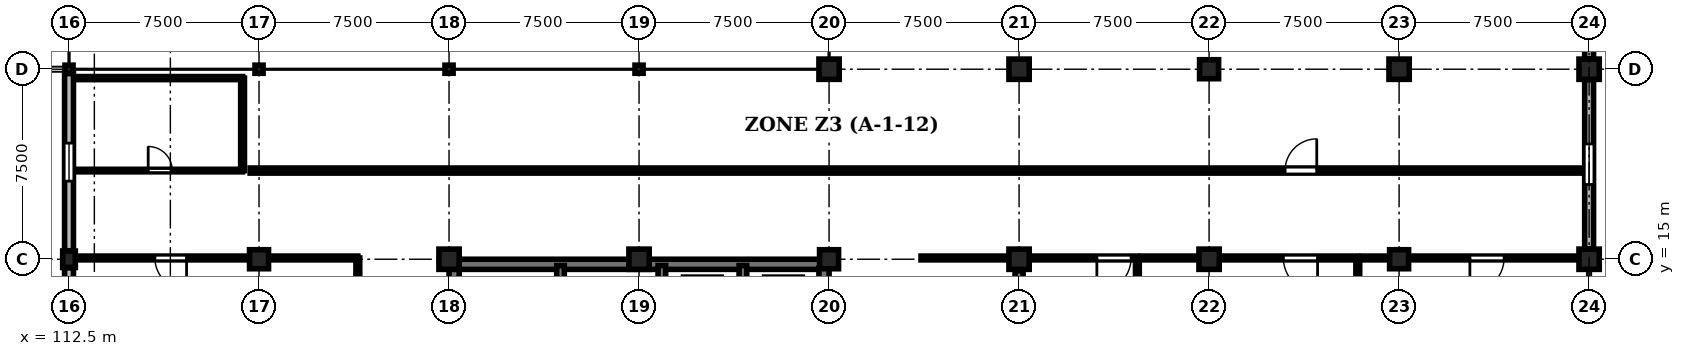
"""IFC4 building model, lengths in metres.
Left out: names, types, materials, properties, quantities, classifications, styles, units other than length and angle.
Written with IfcOpenShell. Run it as: python <this file> out.ifc"""

import sys

from ifc_helpers import new_model, si_unit, direction, frame, frame_2d, origin, origin_2d, place, context, subcontext, project, spatial, rectangle, circle, extrude, element, fill, save


model = new_model("IFC4")
c1 = context("Model", 3, precision=1e-05, world=origin(), true_north=direction((0.0, 1.0)))
c2 = subcontext(c1, "Body", "Model", "MODEL_VIEW")
j1 = project(units=[si_unit("LENGTHUNIT", "METRE"), si_unit("PLANEANGLEUNIT", "RADIAN")], contexts=[c1])
p1 = place(None, origin())
s1 = spatial("IfcSite", under=j1, at=p1, CompositionType="ELEMENT")
p2 = place(p1, origin())
s2 = spatial("IfcBuilding", under=s1, at=p2, CompositionType="ELEMENT")
p3 = place(p2, origin())
s3 = spatial("IfcBuildingStorey", under=s2, at=p3, CompositionType="ELEMENT", Elevation=0.0)
p4 = place(p3, frame((112.5, 15.0, 0.0), z_axis=(0.0, 0.0, 1.0), x_axis=(1.0, 0.0, 0.0)))
e1 = element("IfcColumn", 1, at=p4, inside=s3, PredefinedType="COLUMN", context=c2, shape_type="SweptSolid", body=[
    extrude(rectangle(XDim=0.5, YDim=0.65, at=origin_2d()), origin(), (0.0, 0.0, 1.0), 4.8),
])
p5 = place(p3, frame((112.5, 22.5, 0.0), z_axis=(0.0, 0.0, 1.0), x_axis=(1.0, 0.0, 0.0)))
e2 = element("IfcColumn", 2, at=p5, inside=s3, PredefinedType="COLUMN", context=c2, shape_type="SweptSolid", body=[
    extrude(rectangle(XDim=0.32, YDim=0.32, at=origin_2d()), origin(), (0.0, 0.0, 1.0), 4.8),
])
p6 = place(p3, frame((120.0, 15.0, 0.0), z_axis=(0.0, 0.0, 1.0), x_axis=(1.0, 0.0, 0.0)))
e3 = element("IfcColumn", 3, at=p6, inside=s3, PredefinedType="COLUMN", context=c2, shape_type="SweptSolid", body=[
    extrude(circle(Radius=0.375, at=origin_2d()), origin(), (0.0, 0.0, 1.0), 4.8),
])
p7 = place(p3, frame((120.0, 22.5, 0.0), z_axis=(0.0, 0.0, 1.0), x_axis=(1.0, 0.0, 0.0)))
e4 = element("IfcColumn", 4, at=p7, inside=s3, PredefinedType="COLUMN", context=c2, shape_type="SweptSolid", body=[
    extrude(rectangle(XDim=0.32, YDim=0.32, at=origin_2d()), origin(), (0.0, 0.0, 1.0), 4.8),
])
p8 = place(p3, frame((127.5, 15.0, 0.0), z_axis=(0.0, 0.0, 1.0), x_axis=(1.0, 0.0, 0.0)))
e5 = element("IfcColumn", 5, at=p8, inside=s3, PredefinedType="COLUMN", context=c2, shape_type="SweptSolid", body=[
    extrude(rectangle(XDim=0.8, YDim=0.8, at=origin_2d()), origin(), (0.0, 0.0, 1.0), 4.8),
])
p9 = place(p3, frame((127.5, 22.5, 0.0), z_axis=(0.0, 0.0, 1.0), x_axis=(1.0, 0.0, 0.0)))
e6 = element("IfcColumn", 6, at=p9, inside=s3, PredefinedType="COLUMN", context=c2, shape_type="SweptSolid", body=[
    extrude(rectangle(XDim=0.32, YDim=0.32, at=origin_2d()), origin(), (0.0, 0.0, 1.0), 4.8),
])
p10 = place(p3, frame((135.0, 15.0, 0.0), z_axis=(0.0, 0.0, 1.0), x_axis=(1.0, 0.0, 0.0)))
e7 = element("IfcColumn", 7, at=p10, inside=s3, PredefinedType="COLUMN", context=c2, shape_type="SweptSolid", body=[
    extrude(rectangle(XDim=0.8, YDim=0.8, at=origin_2d()), origin(), (0.0, 0.0, 1.0), 4.8),
])
p11 = place(p3, frame((135.0, 22.5, 0.0), z_axis=(0.0, 0.0, 1.0), x_axis=(1.0, 0.0, 0.0)))
e8 = element("IfcColumn", 8, at=p11, inside=s3, PredefinedType="COLUMN", context=c2, shape_type="SweptSolid", body=[
    extrude(rectangle(XDim=0.32, YDim=0.32, at=origin_2d()), origin(), (0.0, 0.0, 1.0), 4.8),
])
p12 = place(p3, frame((142.5, 15.0, 0.0), z_axis=(0.0, 0.0, 1.0), x_axis=(1.0, 0.0, 0.0)))
e9 = element("IfcColumn", 9, at=p12, inside=s3, PredefinedType="COLUMN", context=c2, shape_type="SweptSolid", body=[
    extrude(circle(Radius=0.375, at=origin_2d()), origin(), (0.0, 0.0, 1.0), 4.8),
])
for number, where, z_axis, x_axis in (
    (10, (142.5, 22.5, 0.0), (0.0, 0.0, 1.0), (1.0, 0.0, 0.0)),
    (11, (150.0, 15.0, 0.0), (0.0, 0.0, 1.0), (1.0, 0.0, 0.0)),
    (12, (150.0, 22.5, 0.0), (0.0, 0.0, 1.0), (1.0, 0.0, 0.0)),
    (13, (157.5, 15.0, 0.0), (0.0, 0.0, 1.0), (1.0, 0.0, 0.0)),
):
    element("IfcColumn", number, at=place(p3, frame(where, z_axis=z_axis, x_axis=x_axis)), inside=s3, PredefinedType="COLUMN", context=c2, shape_type="SweptSolid", body=[
        extrude(rectangle(XDim=0.8, YDim=0.8, at=origin_2d()), origin(), (0.0, 0.0, 1.0), 4.8),
    ])
for number, where, z_axis, x_axis in (
    (14, (157.5, 22.5, 0.0), (0.0, 0.0, 1.0), (1.0, 0.0, 0.0)),
    (15, (165.0, 15.0, 0.0), (0.0, 0.0, 1.0), (1.0, 0.0, 0.0)),
):
    element("IfcColumn", number, at=place(p3, frame(where, z_axis=z_axis, x_axis=x_axis)), inside=s3, PredefinedType="COLUMN", context=c2, shape_type="SweptSolid", body=[
        extrude(circle(Radius=0.375, at=origin_2d()), origin(), (0.0, 0.0, 1.0), 4.8),
    ])
for number, where, z_axis, x_axis in (
    (16, (165.0, 22.5, 0.0), (0.0, 0.0, 1.0), (1.0, 0.0, 0.0)),
    (17, (172.5, 15.0, 0.0), (0.0, 0.0, 1.0), (1.0, 0.0, 0.0)),
    (18, (172.5, 22.5, 0.0), (0.0, 0.0, 1.0), (1.0, 0.0, 0.0)),
):
    element("IfcColumn", number, at=place(p3, frame(where, z_axis=z_axis, x_axis=x_axis)), inside=s3, PredefinedType="COLUMN", context=c2, shape_type="SweptSolid", body=[
        extrude(rectangle(XDim=0.8, YDim=0.8, at=origin_2d()), origin(), (0.0, 0.0, 1.0), 4.8),
    ])
p13 = place(p3, frame((150.0, 7.95, 0.0), z_axis=(0.0, 0.0, 1.0), x_axis=(0.0, 1.0, 0.0)))
e19 = element("IfcWall", 19, at=p13, inside=s3, PredefinedType="SHEAR", context=c2, shape_type="SweptSolid", body=[
    extrude(rectangle(XDim=6.6, YDim=0.32, at=frame_2d((3.3, 0.0))), origin(), (0.0, 0.0, 1.0), 3.95),
])
p14 = place(p3, frame((112.5, 7.885, 0.0), z_axis=(0.0, 0.0, 1.0), x_axis=(0.0, 1.0, 0.0)))
e20 = element("IfcWall", 20, at=p14, inside=s3, PredefinedType="STANDARD", context=c2, shape_type="SweptSolid", body=[
    extrude(rectangle(XDim=6.78, YDim=0.35, at=frame_2d((3.39, 0.0))), origin(), (0.0, 0.0, 1.0), 3.9),
])
p15 = place(p14, frame((2.49, 0.0, 0.9)))
e21 = element("IfcOpeningElement", 21, at=p15, cuts=e20, PredefinedType="OPENING", context=c2, shape_type="SweptSolid", body=[
    extrude(rectangle(XDim=1.8, YDim=2.4, at=frame_2d((0.9, 1.2))), frame((0.0, 0.185, 0.0), z_axis=(0.0, -1.0, 0.0), x_axis=(1.0, 0.0, 0.0)), (0.0, 0.0, 1.0), 0.37),
])
p16 = place(p3, frame((112.5, 15.335, 0.0), z_axis=(0.0, 0.0, 1.0), x_axis=(0.0, 1.0, 0.0)))
e22 = element("IfcWall", 22, at=p16, inside=s3, PredefinedType="STANDARD", context=c2, shape_type="SweptSolid", body=[
    extrude(rectangle(XDim=6.995, YDim=0.35, at=frame_2d((3.498, 0.0))), origin(), (0.0, 0.0, 1.0), 3.9),
])
p17 = place(p16, frame((2.748, 0.0, 0.9)))
e23 = element("IfcOpeningElement", 23, at=p17, cuts=e22, PredefinedType="OPENING", context=c2, shape_type="SweptSolid", body=[
    extrude(rectangle(XDim=1.5, YDim=2.4, at=frame_2d((0.75, 1.2))), frame((0.0, 0.185, 0.0), z_axis=(0.0, -1.0, 0.0), x_axis=(1.0, 0.0, 0.0)), (0.0, 0.0, 1.0), 0.37),
])
p18 = place(p3, frame((172.5, 22.09, 0.0), z_axis=(0.0, 0.0, 1.0), x_axis=(0.0, -1.0, 0.0)))
e24 = element("IfcWall", 24, at=p18, inside=s3, PredefinedType="STANDARD", context=c2, shape_type="SweptSolid", body=[
    extrude(rectangle(XDim=6.68, YDim=0.35, at=frame_2d((3.34, 0.0))), origin(), (0.0, 0.0, 1.0), 3.9),
])
p19 = place(p18, frame((2.54, 0.0, 0.9)))
e25 = element("IfcOpeningElement", 25, at=p19, cuts=e24, PredefinedType="OPENING", context=c2, shape_type="SweptSolid", body=[
    extrude(rectangle(XDim=1.6, YDim=1.95, at=frame_2d((0.8, 0.975))), frame((0.0, 0.185, 0.0), z_axis=(0.0, -1.0, 0.0), x_axis=(1.0, 0.0, 0.0)), (0.0, 0.0, 1.0), 0.37),
])
p20 = place(p3, frame((172.5, 31.165, 0.0), z_axis=(0.0, 0.0, 1.0), x_axis=(0.0, -1.0, 0.0)))
e26 = element("IfcWall", 26, at=p20, inside=s3, PredefinedType="STANDARD", context=c2, shape_type="SweptSolid", body=[
    extrude(rectangle(XDim=8.255, YDim=0.35, at=frame_2d((4.127, 0.0))), origin(), (0.0, 0.0, 1.0), 3.95),
])
p21 = place(p20, frame((3.228, 0.0, 0.9)))
e27 = element("IfcOpeningElement", 27, at=p21, cuts=e26, PredefinedType="OPENING", context=c2, shape_type="SweptSolid", body=[
    extrude(rectangle(XDim=1.8, YDim=1.95, at=frame_2d((0.9, 0.975))), frame((0.0, 0.185, 0.0), z_axis=(0.0, -1.0, 0.0), x_axis=(1.0, 0.0, 0.0)), (0.0, 0.0, 1.0), 0.37),
])
p22 = place(p3, frame((127.85, 14.8, 0.0), z_axis=(0.0, 0.0, 1.0), x_axis=(1.0, 0.0, 0.0)))
e28 = element("IfcWall", 28, at=p22, inside=s3, PredefinedType="SHEAR", context=c2, shape_type="SweptSolid", body=[
    extrude(rectangle(XDim=14.3, YDim=0.4, at=frame_2d((7.15, 0.0))), origin(), (0.0, 0.0, 1.0), 4.5),
])
p23 = place(p3, frame((127.7, 7.85, 0.0), z_axis=(0.0, 0.0, 1.0), x_axis=(0.0, 1.0, 0.0)))
e29 = element("IfcWall", 29, at=p23, inside=s3, PredefinedType="SHEAR", context=c2, shape_type="SweptSolid", body=[
    extrude(rectangle(XDim=6.8, YDim=0.4, at=frame_2d((3.4, 0.0))), origin(), (0.0, 0.0, 1.0), 4.5),
])
p24 = place(p3, frame((142.3, 11.6, 0.0), z_axis=(0.0, 0.0, 1.0), x_axis=(0.0, 1.0, 0.0)))
e30 = element("IfcWall", 30, at=p24, inside=s3, PredefinedType="SHEAR", context=c2, shape_type="SweptSolid", body=[
    extrude(rectangle(XDim=3.05, YDim=0.4, at=frame_2d((1.525, 0.0))), origin(), (0.0, 0.0, 1.0), 4.5),
])
for number, where, z_axis, x_axis in (
    (31, (131.9, 11.6, 0.0), (0.0, 0.0, 1.0), (0.0, 1.0, 0.0)),
    (32, (135.9, 11.6, 0.0), (0.0, 0.0, 1.0), (0.0, 1.0, 0.0)),
    (33, (139.1, 11.6, 0.0), (0.0, 0.0, 1.0), (0.0, 1.0, 0.0)),
):
    element("IfcWall", number, at=place(p3, frame(where, z_axis=z_axis, x_axis=x_axis)), inside=s3, PredefinedType="SHEAR", context=c2, shape_type="SweptSolid", body=[
        extrude(rectangle(XDim=3.15, YDim=0.3, at=frame_2d((1.575, 0.0))), origin(), (0.0, 0.0, 1.0), 4.5),
    ])
p25 = place(p3, frame((123.9, 15.05, 0.0), z_axis=(0.0, 0.0, 1.0), x_axis=(-1.0, 0.0, 0.0)))
e34 = element("IfcWall", 34, at=p25, inside=s3, PredefinedType="PARTITIONING", context=c2, shape_type="SweptSolid", body=[
    extrude(rectangle(XDim=11.05, YDim=0.15, at=frame_2d((5.525, 0.0))), origin(), (0.0, 0.0, 1.0), 3.835),
])
p26 = place(p25, frame((6.76, 0.0, 0.0)))
e35 = element("IfcOpeningElement", 35, at=p26, cuts=e34, PredefinedType="OPENING", context=c2, shape_type="SweptSolid", body=[
    extrude(rectangle(XDim=1.25, YDim=2.2, at=frame_2d((0.625, 1.1))), frame((0.0, 0.085, 0.0), z_axis=(0.0, -1.0, 0.0), x_axis=(1.0, 0.0, 0.0)), (0.0, 0.0, 1.0), 0.17),
])
p27 = place(p3, frame((154.67, 15.05, 0.0), z_axis=(0.0, 0.0, 1.0), x_axis=(-1.0, 0.0, 0.0)))
e36 = element("IfcWall", 36, at=p27, inside=s3, PredefinedType="PARTITIONING", context=c2, shape_type="SweptSolid", body=[
    extrude(rectangle(XDim=8.54, YDim=0.15, at=frame_2d((4.27, 0.0))), origin(), (0.0, 0.0, 1.0), 3.835),
])
p28 = place(p27, frame((0.25, 0.0, 0.0)))
e37 = element("IfcOpeningElement", 37, at=p28, cuts=e36, PredefinedType="OPENING", context=c2, shape_type="SweptSolid", body=[
    extrude(rectangle(XDim=1.35, YDim=2.25, at=frame_2d((0.675, 1.125))), frame((0.0, 0.085, 0.0), z_axis=(0.0, -1.0, 0.0), x_axis=(1.0, 0.0, 0.0)), (0.0, 0.0, 1.0), 0.17),
])
p29 = place(p3, frame((163.37, 15.05, 0.0), z_axis=(0.0, 0.0, 1.0), x_axis=(-1.0, 0.0, 0.0)))
e38 = element("IfcWall", 38, at=p29, inside=s3, PredefinedType="PARTITIONING", context=c2, shape_type="SweptSolid", body=[
    extrude(rectangle(XDim=8.54, YDim=0.15, at=frame_2d((4.27, 0.0))), origin(), (0.0, 0.0, 1.0), 3.835),
])
p30 = place(p29, frame((1.588, 0.0, 0.0)))
e39 = element("IfcOpeningElement", 39, at=p30, cuts=e38, PredefinedType="OPENING", context=c2, shape_type="SweptSolid", body=[
    extrude(rectangle(XDim=1.35, YDim=2.25, at=frame_2d((0.675, 1.125))), frame((0.0, 0.085, 0.0), z_axis=(0.0, -1.0, 0.0), x_axis=(1.0, 0.0, 0.0)), (0.0, 0.0, 1.0), 0.17),
])
p31 = place(p3, frame((172.07, 15.05, 0.0), z_axis=(0.0, 0.0, 1.0), x_axis=(-1.0, 0.0, 0.0)))
e40 = element("IfcWall", 40, at=p31, inside=s3, PredefinedType="PARTITIONING", context=c2, shape_type="SweptSolid", body=[
    extrude(rectangle(XDim=8.54, YDim=0.15, at=frame_2d((4.27, 0.0))), origin(), (0.0, 0.0, 1.0), 3.835),
])
p32 = place(p31, frame((2.926, 0.0, 0.0)))
e41 = element("IfcOpeningElement", 41, at=p32, cuts=e40, PredefinedType="OPENING", context=c2, shape_type="SweptSolid", body=[
    extrude(rectangle(XDim=1.35, YDim=2.25, at=frame_2d((0.675, 1.125))), frame((0.0, 0.085, 0.0), z_axis=(0.0, -1.0, 0.0), x_axis=(1.0, 0.0, 0.0)), (0.0, 0.0, 1.0), 0.17),
])
p33 = place(p3, frame((112.85, 18.5, 0.0), z_axis=(0.0, 0.0, 1.0), x_axis=(1.0, 0.0, 0.0)))
e42 = element("IfcWall", 42, at=p33, inside=s3, PredefinedType="PARTITIONING", context=c2, shape_type="SweptSolid", body=[
    extrude(rectangle(XDim=6.5, YDim=0.1, at=frame_2d((3.25, 0.0))), origin(), (0.0, 0.0, 1.0), 4.485),
])
p34 = place(p33, frame((2.775, 0.0, 0.0)))
e43 = element("IfcOpeningElement", 43, at=p34, cuts=e42, PredefinedType="OPENING", context=c2, shape_type="SweptSolid", body=[
    extrude(rectangle(XDim=0.95, YDim=2.15, at=frame_2d((0.475, 1.075))), frame((0.0, 0.06, 0.0), z_axis=(0.0, -1.0, 0.0), x_axis=(1.0, 0.0, 0.0)), (0.0, 0.0, 1.0), 0.12),
])
p35 = place(p3, frame((119.65, 18.5, 0.0), z_axis=(0.0, 0.0, 1.0), x_axis=(1.0, 0.0, 0.0)))
e44 = element("IfcWall", 44, at=p35, inside=s3, PredefinedType="STANDARD", context=c2, shape_type="SweptSolid", body=[
    extrude(rectangle(XDim=52.5, YDim=0.2, at=frame_2d((26.25, 0.0))), origin(), (0.0, 0.0, 1.0), 4.485),
])
p36 = place(p35, frame((40.85, 0.0, 0.0)))
e45 = element("IfcOpeningElement", 45, at=p36, cuts=e44, PredefinedType="OPENING", context=c2, shape_type="SweptSolid", body=[
    extrude(rectangle(XDim=1.25, YDim=2.2, at=frame_2d((0.625, 1.1))), frame((0.0, 0.11, 0.0), z_axis=(0.0, -1.0, 0.0), x_axis=(1.0, 0.0, 0.0)), (0.0, 0.0, 1.0), 0.22),
])
for number, where, z_axis, x_axis in (
    (46, (123.9, 7.85, 0.0), (0.0, 0.0, 1.0), (0.0, 1.0, 0.0)),
    (47, (154.67, 7.85, 0.0), (0.0, 0.0, 1.0), (0.0, 1.0, 0.0)),
    (48, (163.37, 7.85, 0.0), (0.0, 0.0, 1.0), (0.0, 1.0, 0.0)),
):
    element("IfcWall", number, at=place(p3, frame(where, z_axis=z_axis, x_axis=x_axis)), inside=s3, PredefinedType="PARTITIONING", context=c2, shape_type="SweptSolid", body=[
        extrude(rectangle(XDim=7.2, YDim=0.15, at=frame_2d((3.6, 0.0))), origin(), (0.0, 0.0, 1.0), 4.485),
    ])
p37 = place(p3, frame((119.35, 18.5, 0.0), z_axis=(0.0, 0.0, 1.0), x_axis=(0.0, 1.0, 0.0)))
e49 = element("IfcWall", 49, at=p37, inside=s3, PredefinedType="PARTITIONING", context=c2, shape_type="SweptSolid", body=[
    extrude(rectangle(XDim=3.65, YDim=0.15, at=frame_2d((1.825, 0.0))), origin(), (0.0, 0.0, 1.0), 4.485),
])
p38 = place(p3, frame((112.85, 22.15, 0.0), z_axis=(0.0, 0.0, 1.0), x_axis=(1.0, 0.0, 0.0)))
e50 = element("IfcWall", 50, at=p38, inside=s3, PredefinedType="PARTITIONING", context=c2, shape_type="SweptSolid", body=[
    extrude(rectangle(XDim=6.5, YDim=0.12, at=frame_2d((3.25, 0.0))), origin(), (0.0, 0.0, 1.0), 3.885),
])
p39 = place(p17, origin())
e51 = element("IfcWindow", 51, at=p39, inside=s3, PartitioningType="SINGLE_PANEL", PredefinedType="WINDOW", context=c2, shape_type="SweptSolid", body=[
    extrude(rectangle(XDim=1.5, YDim=2.4, at=frame_2d((0.75, 1.2))), frame((0.0, 0.03, 0.0), z_axis=(0.0, -1.0, 0.0), x_axis=(1.0, 0.0, 0.0)), (0.0, 0.0, 1.0), 0.06),
])
fill(e23, e51)
p40 = place(p19, origin())
e52 = element("IfcWindow", 52, at=p40, inside=s3, PartitioningType="SINGLE_PANEL", PredefinedType="WINDOW", context=c2, shape_type="SweptSolid", body=[
    extrude(rectangle(XDim=1.6, YDim=1.95, at=frame_2d((0.8, 0.975))), frame((0.0, 0.03, 0.0), z_axis=(0.0, -1.0, 0.0), x_axis=(1.0, 0.0, 0.0)), (0.0, 0.0, 1.0), 0.06),
])
fill(e25, e52)
p41 = place(p26, origin())
e53 = element("IfcDoor", 53, at=p41, inside=s3, OperationType="SINGLE_SWING_LEFT", PredefinedType="DOOR", context=c2, shape_type="SweptSolid", body=[
    extrude(rectangle(XDim=1.25, YDim=2.2, at=frame_2d((0.625, 1.1))), frame((0.0, 0.025, 0.0), z_axis=(0.0, -1.0, 0.0), x_axis=(1.0, 0.0, 0.0)), (0.0, 0.0, 1.0), 0.05),
])
fill(e35, e53)
p42 = place(p28, origin())
e54 = element("IfcDoor", 54, at=p42, inside=s3, OperationType="SINGLE_SWING_RIGHT", PredefinedType="DOOR", context=c2, shape_type="SweptSolid", body=[
    extrude(rectangle(XDim=1.35, YDim=2.25, at=frame_2d((0.675, 1.125))), frame((0.0, 0.025, 0.0), z_axis=(0.0, -1.0, 0.0), x_axis=(1.0, 0.0, 0.0)), (0.0, 0.0, 1.0), 0.05),
])
fill(e37, e54)
p43 = place(p30, origin())
e55 = element("IfcDoor", 55, at=p43, inside=s3, OperationType="SINGLE_SWING_LEFT", PredefinedType="DOOR", context=c2, shape_type="SweptSolid", body=[
    extrude(rectangle(XDim=1.35, YDim=2.25, at=frame_2d((0.675, 1.125))), frame((0.0, 0.025, 0.0), z_axis=(0.0, -1.0, 0.0), x_axis=(1.0, 0.0, 0.0)), (0.0, 0.0, 1.0), 0.05),
])
fill(e39, e55)
p44 = place(p32, origin())
e56 = element("IfcDoor", 56, at=p44, inside=s3, OperationType="SINGLE_SWING_RIGHT", PredefinedType="DOOR", context=c2, shape_type="SweptSolid", body=[
    extrude(rectangle(XDim=1.35, YDim=2.25, at=frame_2d((0.675, 1.125))), frame((0.0, 0.025, 0.0), z_axis=(0.0, -1.0, 0.0), x_axis=(1.0, 0.0, 0.0)), (0.0, 0.0, 1.0), 0.05),
])
fill(e41, e56)
p45 = place(p34, origin())
e57 = element("IfcDoor", 57, at=p45, inside=s3, OperationType="SINGLE_SWING_LEFT", PredefinedType="DOOR", context=c2, shape_type="SweptSolid", body=[
    extrude(rectangle(XDim=0.95, YDim=2.15, at=frame_2d((0.475, 1.075))), frame((0.0, 0.025, 0.0), z_axis=(0.0, -1.0, 0.0), x_axis=(1.0, 0.0, 0.0)), (0.0, 0.0, 1.0), 0.05),
])
fill(e43, e57)
p46 = place(p36, origin())
e58 = element("IfcDoor", 58, at=p46, inside=s3, OperationType="SINGLE_SWING_RIGHT", PredefinedType="DOOR", context=c2, shape_type="SweptSolid", body=[
    extrude(rectangle(XDim=1.25, YDim=2.2, at=frame_2d((0.625, 1.1))), frame((0.0, 0.025, 0.0), z_axis=(0.0, -1.0, 0.0), x_axis=(1.0, 0.0, 0.0)), (0.0, 0.0, 1.0), 0.05),
])
fill(e45, e58)
save(model, sys.argv[1])
